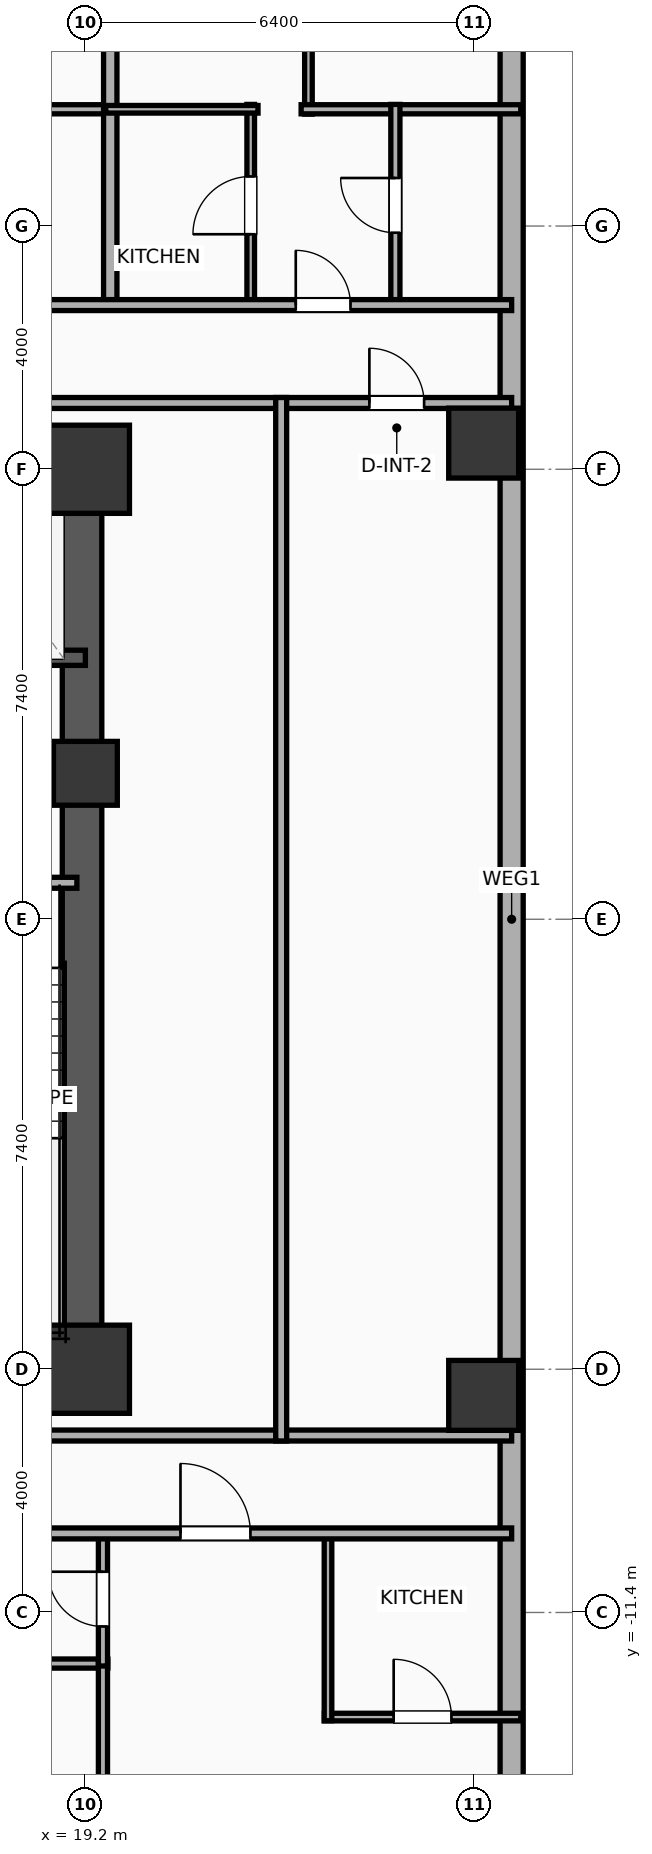
"""IFC4 building model, lengths in metres.
Left out: names, types, materials, properties, quantities, classifications, styles, units other than length and angle.
Written with IfcOpenShell. Run it as: python <this file> out.ifc"""

import sys

from ifc_helpers import new_model, si_unit, direction, frame, frame_2d, origin, origin_2d, place, context, subcontext, project, spatial, rectangle, hollow_rectangle, extrude, element, fill, save


model = new_model("IFC4")
c1 = context("Model", 3, precision=1e-05, world=origin(), true_north=direction((0.0, 1.0)))
c2 = subcontext(c1, "Body", "Model", "MODEL_VIEW")
j1 = project(units=[si_unit("LENGTHUNIT", "METRE"), si_unit("PLANEANGLEUNIT", "RADIAN")], contexts=[c1])
p1 = place(None, origin())
s1 = spatial("IfcSite", under=j1, at=p1, CompositionType="ELEMENT")
p2 = place(p1, origin())
s2 = spatial("IfcBuilding", under=s1, at=p2, CompositionType="ELEMENT")
p3 = place(p2, frame((0.0, 0.0, 37.7)))
s3 = spatial("IfcBuildingStorey", under=s2, at=p3, CompositionType="ELEMENT", Elevation=37.7)
p4 = place(p3, frame((19.2, -7.4, 0.0), z_axis=(0.0, 0.0, 1.0), x_axis=(1.0, 0.0, 0.0)))
e1 = element("IfcColumn", 1, at=p4, inside=s3, PredefinedType="COLUMN", context=c2, shape_type="SweptSolid", body=[
    extrude(rectangle(XDim=1.45, YDim=1.45, at=origin_2d()), origin(), (0.0, 0.0, 1.0), 3.9),
])
p5 = place(p3, frame((19.2, 2.4, 0.0), z_axis=(0.0, 0.0, 1.0), x_axis=(1.0, 0.0, 0.0)))
e2 = element("IfcColumn", 2, at=p5, inside=s3, PredefinedType="COLUMN", context=c2, shape_type="SweptSolid", body=[
    extrude(rectangle(XDim=1.05, YDim=1.05, at=origin_2d()), origin(), (0.0, 0.0, 1.0), 3.9),
])
p6 = place(p3, frame((19.2, 7.4, 0.0), z_axis=(0.0, 0.0, 1.0), x_axis=(1.0, 0.0, 0.0)))
e3 = element("IfcColumn", 3, at=p6, inside=s3, PredefinedType="COLUMN", context=c2, shape_type="SweptSolid", body=[
    extrude(rectangle(XDim=1.45, YDim=1.45, at=origin_2d()), origin(), (0.0, 0.0, 1.0), 3.9),
])
for number, where, z_axis, x_axis in (
    (4, (12.075, -7.4, 0.0), (0.0, 0.0, 1.0), (1.0, 0.0, 0.0)),
    (5, (12.075, 7.4, 0.0), (0.0, 0.0, 1.0), (1.0, 0.0, 0.0)),
):
    element("IfcWall", number, at=place(p3, frame(where, z_axis=z_axis, x_axis=x_axis)), inside=s3, PredefinedType="SHEAR", context=c2, shape_type="SweptSolid", body=[
        extrude(rectangle(XDim=7.45, YDim=0.65, at=frame_2d((3.725, 0.0))), origin(), (0.0, 0.0, 1.0), 3.65),
    ])
p7 = place(p3, frame((19.145, -7.4, 0.0), z_axis=(0.0, 0.0, 1.0), x_axis=(0.0, 1.0, 0.0)))
e6 = element("IfcWall", 6, at=p7, inside=s3, PredefinedType="SHEAR", context=c2, shape_type="SweptSolid", body=[
    extrude(rectangle(XDim=14.8, YDim=0.65, at=frame_2d((7.4, 0.0))), origin(), (0.0, 0.0, 1.0), 3.65),
])
p8 = place(p3, frame((15.74, -6.965, 0.0), z_axis=(0.0, 0.0, 1.0), x_axis=(1.0, 0.0, 0.0)))
e7 = element("IfcWall", 7, at=p8, inside=s3, PredefinedType="SOLIDWALL", context=c2, shape_type="SweptSolid", body=[
    extrude(rectangle(XDim=3.46, YDim=0.25, at=frame_2d((1.73, 0.0))), origin(), (0.0, 0.0, 1.0), 3.65),
])
for number, where, z_axis, x_axis in (
    (8, (25.75, -7.83, 0.0), (0.0, 0.0, 1.0), (1.0, 0.0, 0.0)),
    (9, (25.75, 7.83, 0.0), (0.0, 0.0, 1.0), (1.0, 0.0, 0.0)),
):
    element("IfcColumn", number, at=place(p3, frame(where, z_axis=z_axis, x_axis=x_axis)), inside=s3, PredefinedType="COLUMN", context=c2, shape_type="SweptSolid", body=[
        extrude(hollow_rectangle(XDim=1.15, YDim=1.15, WallThickness=0.04, at=origin_2d()), origin(), (0.0, 0.0, 1.0), 3.9),
    ])
p9 = place(p3, frame((26.21, 18.381, 0.0), z_axis=(0.0, 0.0, 1.0), x_axis=(0.0, -1.0, 0.0)))
e10 = element("IfcWall", 10, at=p9, inside=s3, PredefinedType="ELEMENTEDWALL", context=c2, shape_type="SweptSolid", body=[
    extrude(rectangle(XDim=36.763, YDim=0.38, at=frame_2d((18.381, 0.0))), origin(), (0.0, 0.0, 1.0), 3.65),
])
p10 = place(p3, frame((16.6, 4.3, 0.0), z_axis=(0.0, 0.0, 1.0), x_axis=(1.0, 0.0, 0.0)))
e11 = element("IfcWall", 11, at=p10, inside=s3, PredefinedType="SOLIDWALL", context=c2, shape_type="SweptSolid", body=[
    extrude(rectangle(XDim=2.6, YDim=0.25, at=frame_2d((1.3, 0.0))), origin(), (0.0, 0.0, 1.0), 3.65),
])
p11 = place(p3, frame((15.7, 0.6, 0.0), z_axis=(0.0, 0.0, 1.0), x_axis=(1.0, 0.0, 0.0)))
e12 = element("IfcWall", 12, at=p11, inside=s3, PredefinedType="PARTITIONING", context=c2, shape_type="SweptSolid", body=[
    extrude(rectangle(XDim=3.36, YDim=0.18, at=frame_2d((1.68, 0.0))), origin(), (0.0, 0.0, 1.0), 3.65),
])
p12 = place(p11, frame((1.155, 0.0, 0.0)))
e13 = element("IfcOpeningElement", 13, at=p12, cuts=e12, PredefinedType="OPENING", context=c2, shape_type="SweptSolid", body=[
    extrude(rectangle(XDim=1.05, YDim=2.05, at=frame_2d((0.525, 1.025))), frame((0.0, 0.1, 0.0), z_axis=(0.0, -1.0, 0.0), x_axis=(1.0, 0.0, 0.0)), (0.0, 0.0, 1.0), 0.2),
])
p13 = place(p3, frame((9.88, 8.49, 0.0), z_axis=(0.0, 0.0, 1.0), x_axis=(1.0, 0.0, 0.0)))
e14 = element("IfcWall", 14, at=p13, inside=s3, PredefinedType="PARTITIONING", context=c2, shape_type="SweptSolid", body=[
    extrude(rectangle(XDim=16.33, YDim=0.18, at=frame_2d((8.165, 0.0))), origin(), (0.0, 0.0, 1.0), 3.65),
])
p14 = place(p13, frame((13.99, 0.0, 0.0)))
e15 = element("IfcOpeningElement", 15, at=p14, cuts=e14, PredefinedType="OPENING", context=c2, shape_type="SweptSolid", body=[
    extrude(rectangle(XDim=0.9, YDim=2.05, at=frame_2d((0.45, 1.025))), frame((0.0, 0.1, 0.0), z_axis=(0.0, -1.0, 0.0), x_axis=(1.0, 0.0, 0.0)), (0.0, 0.0, 1.0), 0.2),
])
p15 = place(p3, frame((9.88, -8.49, 0.0), z_axis=(0.0, 0.0, 1.0), x_axis=(1.0, 0.0, 0.0)))
e16 = element("IfcWall", 16, at=p15, inside=s3, PredefinedType="PARTITIONING", context=c2, shape_type="SweptSolid", body=[
    extrude(rectangle(XDim=16.33, YDim=0.18, at=frame_2d((8.165, 0.0))), origin(), (0.0, 0.0, 1.0), 3.65),
])
p16 = place(p3, frame((16.079, 13.32, 0.0), z_axis=(0.0, 0.0, 1.0), x_axis=(1.0, 0.0, 0.0)))
e17 = element("IfcWall", 17, at=p16, inside=s3, PredefinedType="PLUMBINGWALL", context=c2, shape_type="SweptSolid", body=[
    extrude(rectangle(XDim=3.605, YDim=0.15, at=frame_2d((1.802, 0.0))), origin(), (0.0, 0.0, 1.0), 3.65),
])
p17 = place(p3, frame((19.609, 10.02, 0.0), z_axis=(0.0, 0.0, 1.0), x_axis=(0.0, 1.0, 0.0)))
e18 = element("IfcWall", 18, at=p17, inside=s3, PredefinedType="PARTITIONING", context=c2, shape_type="SweptSolid", body=[
    extrude(rectangle(XDim=12.19, YDim=0.22, at=frame_2d((6.095, 0.0))), origin(), (0.0, 0.0, 1.0), 3.65),
])
p18 = place(p3, frame((22.868, 13.24, 0.0), z_axis=(0.0, 0.0, 1.0), x_axis=(0.0, 1.0, 0.0)))
e19 = element("IfcWall", 19, at=p18, inside=s3, PredefinedType="PARTITIONING", context=c2, shape_type="SweptSolid", body=[
    extrude(rectangle(XDim=9.026, YDim=0.125, at=frame_2d((4.513, 0.0))), origin(), (0.0, 0.0, 1.0), 2.94),
])
p19 = place(p18, frame((1.716, 0.0, 0.0)))
e20 = element("IfcOpeningElement", 20, at=p19, cuts=e19, PredefinedType="OPENING", context=c2, shape_type="SweptSolid", body=[
    extrude(rectangle(XDim=0.9, YDim=2.05, at=frame_2d((0.45, 1.025))), frame((0.0, 0.073, 0.0), z_axis=(0.0, -1.0, 0.0), x_axis=(1.0, 0.0, 0.0)), (0.0, 0.0, 1.0), 0.145),
])
p20 = place(p3, frame((22.748, 13.32, 0.0), z_axis=(0.0, 0.0, 1.0), x_axis=(1.0, 0.0, 0.0)))
e21 = element("IfcWall", 21, at=p20, inside=s3, PredefinedType="PLUMBINGWALL", context=c2, shape_type="SweptSolid", body=[
    extrude(rectangle(XDim=3.612, YDim=0.15, at=frame_2d((1.806, 0.0))), origin(), (0.0, 0.0, 1.0), 3.65),
])
p21 = place(p3, frame((21.919, 10.08, 0.0), z_axis=(0.0, 0.0, 1.0), x_axis=(0.0, 1.0, 0.0)))
e22 = element("IfcWall", 22, at=p21, inside=s3, PredefinedType="PARTITIONING", context=c2, shape_type="SweptSolid", body=[
    extrude(rectangle(XDim=3.32, YDim=0.125, at=frame_2d((1.66, 0.0))), origin(), (0.0, 0.0, 1.0), 3.65),
])
p22 = place(p21, frame((1.185, 0.0, 0.0)))
e23 = element("IfcOpeningElement", 23, at=p22, cuts=e22, PredefinedType="OPENING", context=c2, shape_type="SweptSolid", body=[
    extrude(rectangle(XDim=0.95, YDim=2.05, at=frame_2d((0.475, 1.025))), frame((0.0, 0.073, 0.0), z_axis=(0.0, -1.0, 0.0), x_axis=(1.0, 0.0, 0.0)), (0.0, 0.0, 1.0), 0.145),
])
p23 = place(p3, frame((19.534, 13.32, 0.0), z_axis=(0.0, 0.0, 1.0), x_axis=(1.0, 0.0, 0.0)))
e24 = element("IfcWall", 24, at=p23, inside=s3, PredefinedType="PARTITIONING", context=c2, shape_type="SweptSolid", body=[
    extrude(rectangle(XDim=2.505, YDim=0.125, at=frame_2d((1.252, 0.0))), origin(), (0.0, 0.0, 1.0), 3.65),
])
p24 = place(p3, frame((24.298, 10.08, 0.0), z_axis=(0.0, 0.0, 1.0), x_axis=(0.0, 1.0, 0.0)))
e25 = element("IfcWall", 25, at=p24, inside=s3, PredefinedType="PLUMBINGWALL", context=c2, shape_type="SweptSolid", body=[
    extrude(rectangle(XDim=3.32, YDim=0.15, at=frame_2d((1.66, 0.0))), origin(), (0.0, 0.0, 1.0), 3.65),
])
p25 = place(p24, frame((1.21, 0.0, 0.0)))
e26 = element("IfcOpeningElement", 26, at=p25, cuts=e25, PredefinedType="OPENING", context=c2, shape_type="SweptSolid", body=[
    extrude(rectangle(XDim=0.9, YDim=2.05, at=frame_2d((0.45, 1.025))), frame((0.0, 0.085, 0.0), z_axis=(0.0, -1.0, 0.0), x_axis=(1.0, 0.0, 0.0)), (0.0, 0.0, 1.0), 0.17),
])
p26 = place(p3, frame((-33.41, 10.1, 0.0), z_axis=(0.0, 0.0, 1.0), x_axis=(1.0, 0.0, 0.0)))
e27 = element("IfcWall", 27, at=p26, inside=s3, PredefinedType="PARTITIONING", context=c2, shape_type="SweptSolid", body=[
    extrude(rectangle(XDim=59.62, YDim=0.18, at=frame_2d((29.81, 0.0))), origin(), (0.0, 0.0, 1.0), 3.65),
])
p27 = place(p26, frame((3.354, 0.0, 0.0)))
e28 = element("IfcOpeningElement", 28, at=p27, cuts=e27, PredefinedType="OPENING", context=c2, shape_type="SweptSolid", body=[
    extrude(rectangle(XDim=1.15, YDim=2.05, at=frame_2d((0.575, 1.025))), frame((0.0, 0.1, 0.0), z_axis=(0.0, -1.0, 0.0), x_axis=(1.0, 0.0, 0.0)), (0.0, 0.0, 1.0), 0.2),
])
p28 = place(p26, frame((10.997, 0.0, 0.0)))
e29 = element("IfcOpeningElement", 29, at=p28, cuts=e27, PredefinedType="OPENING", context=c2, shape_type="SweptSolid", body=[
    extrude(rectangle(XDim=1.15, YDim=2.05, at=frame_2d((0.575, 1.025))), frame((0.0, 0.1, 0.0), z_axis=(0.0, -1.0, 0.0), x_axis=(1.0, 0.0, 0.0)), (0.0, 0.0, 1.0), 0.2),
])
p29 = place(p26, frame((20.232, 0.0, 0.0)))
e30 = element("IfcOpeningElement", 30, at=p29, cuts=e27, PredefinedType="OPENING", context=c2, shape_type="SweptSolid", body=[
    extrude(rectangle(XDim=1.15, YDim=2.05, at=frame_2d((0.575, 1.025))), frame((0.0, 0.1, 0.0), z_axis=(0.0, -1.0, 0.0), x_axis=(1.0, 0.0, 0.0)), (0.0, 0.0, 1.0), 0.2),
])
p30 = place(p26, frame((30.38, 0.0, 0.0)))
e31 = element("IfcOpeningElement", 31, at=p30, cuts=e27, PredefinedType="OPENING", context=c2, shape_type="SweptSolid", body=[
    extrude(rectangle(XDim=1.15, YDim=2.05, at=frame_2d((0.575, 1.025))), frame((0.0, 0.1, 0.0), z_axis=(0.0, -1.0, 0.0), x_axis=(1.0, 0.0, 0.0)), (0.0, 0.0, 1.0), 0.2),
])
p31 = place(p26, frame((40.998, 0.0, 0.0)))
e32 = element("IfcOpeningElement", 32, at=p31, cuts=e27, PredefinedType="OPENING", context=c2, shape_type="SweptSolid", body=[
    extrude(rectangle(XDim=1.15, YDim=2.05, at=frame_2d((0.575, 1.025))), frame((0.0, 0.1, 0.0), z_axis=(0.0, -1.0, 0.0), x_axis=(1.0, 0.0, 0.0)), (0.0, 0.0, 1.0), 0.2),
])
p32 = place(p26, frame((49.428, 0.0, 0.0)))
e33 = element("IfcOpeningElement", 33, at=p32, cuts=e27, PredefinedType="OPENING", context=c2, shape_type="SweptSolid", body=[
    extrude(rectangle(XDim=0.9, YDim=2.05, at=frame_2d((0.45, 1.025))), frame((0.0, 0.1, 0.0), z_axis=(0.0, -1.0, 0.0), x_axis=(1.0, 0.0, 0.0)), (0.0, 0.0, 1.0), 0.2),
])
p33 = place(p26, frame((56.07, 0.0, 0.0)))
e34 = element("IfcOpeningElement", 34, at=p33, cuts=e27, PredefinedType="OPENING", context=c2, shape_type="SweptSolid", body=[
    extrude(rectangle(XDim=0.9, YDim=2.05, at=frame_2d((0.45, 1.025))), frame((0.0, 0.1, 0.0), z_axis=(0.0, -1.0, 0.0), x_axis=(1.0, 0.0, 0.0)), (0.0, 0.0, 1.0), 0.2),
])
p34 = place(p3, frame((16.34, -12.24, 0.0), z_axis=(0.0, 0.0, 1.0), x_axis=(1.0, 0.0, 0.0)))
e35 = element("IfcWall", 35, at=p34, inside=s3, PredefinedType="PLUMBINGWALL", context=c2, shape_type="SweptSolid", body=[
    extrude(rectangle(XDim=3.229, YDim=0.15, at=frame_2d((1.615, 0.0))), origin(), (0.0, 0.0, 1.0), 3.65),
])
p35 = place(p3, frame((19.489, -22.258, 0.0), z_axis=(0.0, 0.0, 1.0), x_axis=(0.0, 1.0, 0.0)))
e36 = element("IfcWall", 36, at=p35, inside=s3, PredefinedType="PLUMBINGWALL", context=c2, shape_type="SweptSolid", body=[
    extrude(rectangle(XDim=10.058, YDim=0.15, at=frame_2d((5.029, 0.0))), origin(), (0.0, 0.0, 1.0), 3.65),
])
p36 = place(p35, frame((6.792, 0.0, 0.0)))
e37 = element("IfcOpeningElement", 37, at=p36, cuts=e36, PredefinedType="OPENING", context=c2, shape_type="SweptSolid", body=[
    extrude(rectangle(XDim=0.9, YDim=2.05, at=frame_2d((0.45, 1.025))), frame((0.0, 0.085, 0.0), z_axis=(0.0, -1.0, 0.0), x_axis=(1.0, 0.0, 0.0)), (0.0, 0.0, 1.0), 0.17),
])
p37 = place(p3, frame((19.489, -12.28, 0.0), z_axis=(0.0, 0.0, 1.0), x_axis=(0.0, 1.0, 0.0)))
e38 = element("IfcWall", 38, at=p37, inside=s3, PredefinedType="PLUMBINGWALL", context=c2, shape_type="SweptSolid", body=[
    extrude(rectangle(XDim=2.2, YDim=0.15, at=frame_2d((1.1, 0.0))), origin(), (0.0, 0.0, 1.0), 3.65),
])
p38 = place(p37, frame((0.65, 0.0, 0.0)))
e39 = element("IfcOpeningElement", 39, at=p38, cuts=e38, PredefinedType="OPENING", context=c2, shape_type="SweptSolid", body=[
    extrude(rectangle(XDim=0.9, YDim=2.05, at=frame_2d((0.45, 1.025))), frame((0.0, 0.085, 0.0), z_axis=(0.0, -1.0, 0.0), x_axis=(1.0, 0.0, 0.0)), (0.0, 0.0, 1.0), 0.17),
])
p39 = place(p3, frame((23.13, -13.12, 0.0), z_axis=(0.0, 0.0, 1.0), x_axis=(1.0, 0.0, 0.0)))
e40 = element("IfcWall", 40, at=p39, inside=s3, PredefinedType="PARTITIONING", context=c2, shape_type="SweptSolid", body=[
    extrude(rectangle(XDim=3.23, YDim=0.125, at=frame_2d((1.615, 0.0))), origin(), (0.0, 0.0, 1.0), 3.65),
])
p40 = place(p39, frame((1.14, 0.0, 0.0)))
e41 = element("IfcOpeningElement", 41, at=p40, cuts=e40, PredefinedType="OPENING", context=c2, shape_type="SweptSolid", body=[
    extrude(rectangle(XDim=0.95, YDim=2.05, at=frame_2d((0.475, 1.025))), frame((0.0, 0.073, 0.0), z_axis=(0.0, -1.0, 0.0), x_axis=(1.0, 0.0, 0.0)), (0.0, 0.0, 1.0), 0.145),
])
p41 = place(p3, frame((23.19, -13.18, 0.0), z_axis=(0.0, 0.0, 1.0), x_axis=(0.0, 1.0, 0.0)))
e42 = element("IfcWall", 42, at=p41, inside=s3, PredefinedType="PARTITIONING", context=c2, shape_type="SweptSolid", body=[
    extrude(rectangle(XDim=3.1, YDim=0.125, at=frame_2d((1.55, 0.0))), origin(), (0.0, 0.0, 1.0), 3.65),
])
p42 = place(p3, frame((-33.41, -10.1, 0.0), z_axis=(0.0, 0.0, 1.0), x_axis=(1.0, 0.0, 0.0)))
e43 = element("IfcWall", 43, at=p42, inside=s3, PredefinedType="PARTITIONING", context=c2, shape_type="SweptSolid", body=[
    extrude(rectangle(XDim=59.62, YDim=0.18, at=frame_2d((29.81, 0.0))), origin(), (0.0, 0.0, 1.0), 3.65),
])
p43 = place(p42, frame((2.746, 0.0, 0.0)))
e44 = element("IfcOpeningElement", 44, at=p43, cuts=e43, PredefinedType="OPENING", context=c2, shape_type="SweptSolid", body=[
    extrude(rectangle(XDim=0.9, YDim=2.05, at=frame_2d((0.45, 1.025))), frame((0.0, 0.1, 0.0), z_axis=(0.0, -1.0, 0.0), x_axis=(1.0, 0.0, 0.0)), (0.0, 0.0, 1.0), 0.2),
])
p44 = place(p42, frame((11.552, 0.0, 0.0)))
e45 = element("IfcOpeningElement", 45, at=p44, cuts=e43, PredefinedType="OPENING", context=c2, shape_type="SweptSolid", body=[
    extrude(rectangle(XDim=1.15, YDim=2.05, at=frame_2d((0.575, 1.025))), frame((0.0, 0.1, 0.0), z_axis=(0.0, -1.0, 0.0), x_axis=(1.0, 0.0, 0.0)), (0.0, 0.0, 1.0), 0.2),
])
p45 = place(p42, frame((22.379, 0.0, 0.0)))
e46 = element("IfcOpeningElement", 46, at=p45, cuts=e43, PredefinedType="OPENING", context=c2, shape_type="SweptSolid", body=[
    extrude(rectangle(XDim=1.15, YDim=2.05, at=frame_2d((0.575, 1.025))), frame((0.0, 0.1, 0.0), z_axis=(0.0, -1.0, 0.0), x_axis=(1.0, 0.0, 0.0)), (0.0, 0.0, 1.0), 0.2),
])
p46 = place(p42, frame((31.28, 0.0, 0.0)))
e47 = element("IfcOpeningElement", 47, at=p46, cuts=e43, PredefinedType="OPENING", context=c2, shape_type="SweptSolid", body=[
    extrude(rectangle(XDim=1.15, YDim=2.05, at=frame_2d((0.575, 1.025))), frame((0.0, 0.1, 0.0), z_axis=(0.0, -1.0, 0.0), x_axis=(1.0, 0.0, 0.0)), (0.0, 0.0, 1.0), 0.2),
])
p47 = place(p42, frame((36.02, 0.0, 0.0)))
e48 = element("IfcOpeningElement", 48, at=p47, cuts=e43, PredefinedType="OPENING", context=c2, shape_type="SweptSolid", body=[
    extrude(rectangle(XDim=0.9, YDim=2.05, at=frame_2d((0.45, 1.025))), frame((0.0, 0.1, 0.0), z_axis=(0.0, -1.0, 0.0), x_axis=(1.0, 0.0, 0.0)), (0.0, 0.0, 1.0), 0.2),
])
p48 = place(p42, frame((40.044, 0.0, 0.0)))
e49 = element("IfcOpeningElement", 49, at=p48, cuts=e43, PredefinedType="OPENING", context=c2, shape_type="SweptSolid", body=[
    extrude(rectangle(XDim=1.15, YDim=2.05, at=frame_2d((0.575, 1.025))), frame((0.0, 0.1, 0.0), z_axis=(0.0, -1.0, 0.0), x_axis=(1.0, 0.0, 0.0)), (0.0, 0.0, 1.0), 0.2),
])
p49 = place(p42, frame((45.613, 0.0, 0.0)))
e50 = element("IfcOpeningElement", 50, at=p49, cuts=e43, PredefinedType="OPENING", context=c2, shape_type="SweptSolid", body=[
    extrude(rectangle(XDim=1.15, YDim=2.05, at=frame_2d((0.575, 1.025))), frame((0.0, 0.1, 0.0), z_axis=(0.0, -1.0, 0.0), x_axis=(1.0, 0.0, 0.0)), (0.0, 0.0, 1.0), 0.2),
])
p50 = place(p42, frame((54.174, 0.0, 0.0)))
e51 = element("IfcOpeningElement", 51, at=p50, cuts=e43, PredefinedType="OPENING", context=c2, shape_type="SweptSolid", body=[
    extrude(rectangle(XDim=1.15, YDim=2.05, at=frame_2d((0.575, 1.025))), frame((0.0, 0.1, 0.0), z_axis=(0.0, -1.0, 0.0), x_axis=(1.0, 0.0, 0.0)), (0.0, 0.0, 1.0), 0.2),
])
p51 = place(p3, frame((22.42, -8.58, 0.0), z_axis=(0.0, 0.0, 1.0), x_axis=(0.0, 1.0, 0.0)))
e52 = element("IfcWall", 52, at=p51, inside=s3, PredefinedType="PARTITIONING", context=c2, shape_type="SweptSolid", body=[
    extrude(rectangle(XDim=17.16, YDim=0.18, at=frame_2d((8.58, 0.0))), origin(), (0.0, 0.0, 1.0), 3.65),
])
p52 = place(p14, origin())
e53 = element("IfcDoor", 53, at=p52, inside=s3, OperationType="SINGLE_SWING_LEFT", PredefinedType="DOOR", context=c2, shape_type="SweptSolid", body=[
    extrude(rectangle(XDim=0.9, YDim=2.05, at=frame_2d((0.45, 1.025))), frame((0.0, 0.025, 0.0), z_axis=(0.0, -1.0, 0.0), x_axis=(1.0, 0.0, 0.0)), (0.0, 0.0, 1.0), 0.05),
])
fill(e15, e53)
p53 = place(p22, origin())
e54 = element("IfcDoor", 54, at=p53, inside=s3, OperationType="SINGLE_SWING_LEFT", PredefinedType="DOOR", context=c2, shape_type="SweptSolid", body=[
    extrude(rectangle(XDim=0.95, YDim=2.05, at=frame_2d((0.475, 1.025))), frame((0.0, 0.025, 0.0), z_axis=(0.0, -1.0, 0.0), x_axis=(1.0, 0.0, 0.0)), (0.0, 0.0, 1.0), 0.05),
])
fill(e23, e54)
p54 = place(p25, origin())
e55 = element("IfcDoor", 55, at=p54, inside=s3, OperationType="SINGLE_SWING_RIGHT", PredefinedType="DOOR", context=c2, shape_type="SweptSolid", body=[
    extrude(rectangle(XDim=0.9, YDim=2.05, at=frame_2d((0.45, 1.025))), frame((0.0, 0.025, 0.0), z_axis=(0.0, -1.0, 0.0), x_axis=(1.0, 0.0, 0.0)), (0.0, 0.0, 1.0), 0.05),
])
fill(e26, e55)
p55 = place(p33, origin())
e56 = element("IfcDoor", 56, at=p55, inside=s3, OperationType="SINGLE_SWING_LEFT", PredefinedType="DOOR", context=c2, shape_type="SweptSolid", body=[
    extrude(rectangle(XDim=0.9, YDim=2.05, at=frame_2d((0.45, 1.025))), frame((0.0, 0.025, 0.0), z_axis=(0.0, -1.0, 0.0), x_axis=(1.0, 0.0, 0.0)), (0.0, 0.0, 1.0), 0.05),
])
fill(e34, e56)
p56 = place(p38, origin())
e57 = element("IfcDoor", 57, at=p56, inside=s3, OperationType="SINGLE_SWING_RIGHT", PredefinedType="DOOR", context=c2, shape_type="SweptSolid", body=[
    extrude(rectangle(XDim=0.9, YDim=2.05, at=frame_2d((0.45, 1.025))), frame((0.0, 0.025, 0.0), z_axis=(0.0, -1.0, 0.0), x_axis=(1.0, 0.0, 0.0)), (0.0, 0.0, 1.0), 0.05),
])
fill(e39, e57)
p57 = place(p40, origin())
e58 = element("IfcDoor", 58, at=p57, inside=s3, OperationType="SINGLE_SWING_LEFT", PredefinedType="DOOR", context=c2, shape_type="SweptSolid", body=[
    extrude(rectangle(XDim=0.95, YDim=2.05, at=frame_2d((0.475, 1.025))), frame((0.0, 0.025, 0.0), z_axis=(0.0, -1.0, 0.0), x_axis=(1.0, 0.0, 0.0)), (0.0, 0.0, 1.0), 0.05),
])
fill(e41, e58)
p58 = place(p50, origin())
e59 = element("IfcDoor", 59, at=p58, inside=s3, OperationType="SINGLE_SWING_LEFT", PredefinedType="DOOR", context=c2, shape_type="SweptSolid", body=[
    extrude(rectangle(XDim=1.15, YDim=2.05, at=frame_2d((0.575, 1.025))), frame((0.0, 0.025, 0.0), z_axis=(0.0, -1.0, 0.0), x_axis=(1.0, 0.0, 0.0)), (0.0, 0.0, 1.0), 0.05),
])
fill(e51, e59)
save(model, sys.argv[1])
